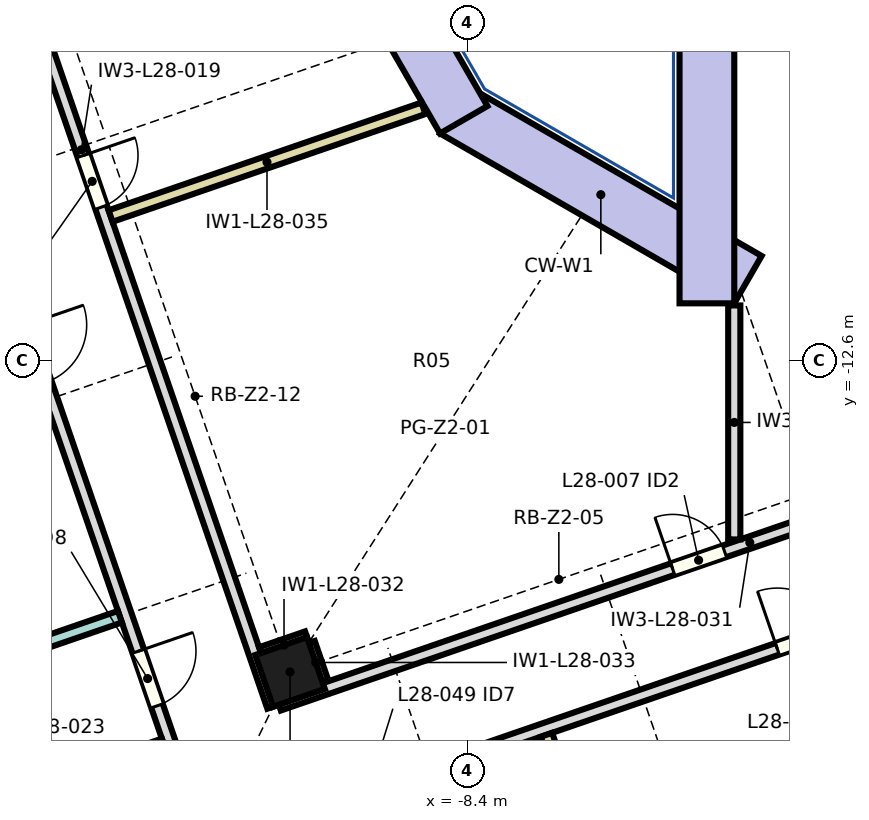
"""IFC4 building model, lengths in metres.
Left out: names, types, materials, properties, quantities, classifications, styles, units other than length and angle.
Written with IfcOpenShell. Run it as: python <this file> out.ifc"""

import sys

from ifc_helpers import new_model, si_unit, direction, frame, frame_2d, origin, origin_2d, place, context, subcontext, project, spatial, rectangle, extrude, element, fill, save


model = new_model("IFC4")
c1 = context("Model", 3, precision=1e-05, world=origin(), true_north=direction((0.0, 1.0)))
c2 = subcontext(c1, "Body", "Model", "MODEL_VIEW")
j1 = project(units=[si_unit("LENGTHUNIT", "METRE"), si_unit("PLANEANGLEUNIT", "RADIAN")], contexts=[c1])
p1 = place(None, origin())
s1 = spatial("IfcSite", under=j1, at=p1, CompositionType="ELEMENT")
p2 = place(p1, origin())
s2 = spatial("IfcBuilding", under=s1, at=p2, CompositionType="ELEMENT")
p3 = place(p2, frame((0.0, 0.0, 134.5)))
s3 = spatial("IfcBuildingStorey", under=s2, at=p3, CompositionType="ELEMENT", Elevation=134.5)
p4 = place(p3, frame((-11.305, -17.695, 0.0), z_axis=(0.0, 0.0, 1.0), x_axis=(0.945518575599, 0.325568154457, 0.0)))
e1 = element("IfcColumn", 1, at=p4, inside=s3, PredefinedType="COLUMN", context=c2, shape_type="SweptSolid", body=[
    extrude(rectangle(XDim=0.9, YDim=0.9, at=origin_2d()), origin(), (0.0, 0.0, 1.0), 3.55),
])
p5 = place(p3, frame((-3.775, -11.243, 0.0), z_axis=(0.0, 0.0, 1.0), x_axis=(-0.866026961591, 0.49999730179, 0.0)))
e2 = element("IfcWall", 2, at=p5, inside=s3, PredefinedType="SHEAR", context=c2, shape_type="SweptSolid", body=[
    extrude(rectangle(XDim=5.587, YDim=0.9, at=frame_2d((2.794, 0.0))), origin(), (0.0, 0.0, 1.0), 3.8),
])
p6 = place(p3, frame((-8.449, -8.614, 0.0), z_axis=(0.0, 0.0, 1.0), x_axis=(-0.499990282633, 0.866031014036, 0.0)))
e3 = element("IfcWall", 3, at=p6, inside=s3, PredefinedType="SHEAR", context=c2, shape_type="SweptSolid", body=[
    extrude(rectangle(XDim=6.47, YDim=0.9, at=frame_2d((3.235, 0.0))), origin(), (0.0, 0.0, 1.0), 3.8),
])
p7 = place(p3, frame((-4.45, 11.633, 0.0), z_axis=(0.0, 0.0, 1.0), x_axis=(0.0, -1.0, 0.0)))
e4 = element("IfcWall", 4, at=p7, inside=s3, PredefinedType="SHEAR", context=c2, shape_type="SweptSolid", body=[
    extrude(rectangle(XDim=23.265, YDim=0.9, at=frame_2d((11.633, 0.0))), origin(), (0.0, 0.0, 1.0), 3.8),
])
p8 = place(p7, frame((14.607, 0.0, 0.0)))
e5 = element("IfcOpeningElement", 5, at=p8, cuts=e4, PredefinedType="OPENING", context=c2, shape_type="SweptSolid", body=[
    extrude(rectangle(XDim=1.1, YDim=2.1, at=frame_2d((0.55, 1.05))), frame((0.0, 0.46, 0.0), z_axis=(0.0, -1.0, 0.0), x_axis=(1.0, 0.0, 0.0)), (0.0, 0.0, 1.0), 0.92),
])
p9 = place(p7, frame((16.958, 0.0, 0.0)))
e6 = element("IfcOpeningElement", 6, at=p9, cuts=e4, PredefinedType="OPENING", context=c2, shape_type="SweptSolid", body=[
    extrude(rectangle(XDim=1.1, YDim=2.1, at=frame_2d((0.55, 1.05))), frame((0.0, 0.46, 0.0), z_axis=(0.0, -1.0, 0.0), x_axis=(1.0, 0.0, 0.0)), (0.0, 0.0, 1.0), 0.92),
])
p10 = place(p7, frame((5.208, 0.0, 0.0)))
e7 = element("IfcOpeningElement", 7, at=p10, cuts=e4, PredefinedType="OPENING", context=c2, shape_type="SweptSolid", body=[
    extrude(rectangle(XDim=1.1, YDim=2.1, at=frame_2d((0.55, 1.05))), frame((0.0, 0.46, 0.0), z_axis=(0.0, -1.0, 0.0), x_axis=(1.0, 0.0, 0.0)), (0.0, 0.0, 1.0), 0.92),
])
p11 = place(p3, frame((-22.623, 8.265, 0.0), z_axis=(0.0, 0.0, 1.0), x_axis=(0.325567058058, -0.945518953119, 0.0)))
e8 = element("IfcWall", 8, at=p11, inside=s3, PredefinedType="PARTITIONING", context=c2, shape_type="SweptSolid", body=[
    extrude(rectangle(XDim=30.48, YDim=0.2, at=frame_2d((15.24, 0.0))), origin(), (0.0, 0.0, 1.0), 3.55),
])
p12 = place(p11, frame((4.195, 0.0, 0.0)))
e9 = element("IfcOpeningElement", 9, at=p12, cuts=e8, PredefinedType="OPENING", context=c2, shape_type="SweptSolid", body=[
    extrude(rectangle(XDim=0.95, YDim=2.1, at=frame_2d((0.475, 1.05))), frame((0.0, 0.11, 0.0), z_axis=(0.0, -1.0, 0.0), x_axis=(1.0, 0.0, 0.0)), (0.0, 0.0, 1.0), 0.22),
])
p13 = place(p11, frame((10.045, 0.0, 0.0)))
e10 = element("IfcOpeningElement", 10, at=p13, cuts=e8, PredefinedType="OPENING", context=c2, shape_type="SweptSolid", body=[
    extrude(rectangle(XDim=0.95, YDim=2.1, at=frame_2d((0.475, 1.05))), frame((0.0, 0.11, 0.0), z_axis=(0.0, -1.0, 0.0), x_axis=(1.0, 0.0, 0.0)), (0.0, 0.0, 1.0), 0.22),
])
p14 = place(p11, frame((21.42, 0.0, 0.0)))
e11 = element("IfcOpeningElement", 11, at=p14, cuts=e8, PredefinedType="OPENING", context=c2, shape_type="SweptSolid", body=[
    extrude(rectangle(XDim=1.0, YDim=2.1, at=frame_2d((0.5, 1.05))), frame((0.0, 0.11, 0.0), z_axis=(0.0, -1.0, 0.0), x_axis=(1.0, 0.0, 0.0)), (0.0, 0.0, 1.0), 0.22),
])
p15 = place(p11, frame((27.095, 0.0, 0.0)))
e12 = element("IfcOpeningElement", 12, at=p15, cuts=e8, PredefinedType="OPENING", context=c2, shape_type="SweptSolid", body=[
    extrude(rectangle(XDim=0.95, YDim=2.1, at=frame_2d((0.475, 1.05))), frame((0.0, 0.11, 0.0), z_axis=(0.0, -1.0, 0.0), x_axis=(1.0, 0.0, 0.0)), (0.0, 0.0, 1.0), 0.22),
])
p16 = place(p3, frame((-17.892, 0.051, 0.0), z_axis=(0.0, 0.0, 1.0), x_axis=(0.325580537834, -0.94551431157, 0.0)))
e13 = element("IfcWall", 13, at=p16, inside=s3, PredefinedType="PARTITIONING", context=c2, shape_type="SweptSolid", body=[
    extrude(rectangle(XDim=19.374, YDim=0.2, at=frame_2d((9.687, 0.0))), origin(), (0.0, 0.0, 1.0), 3.55),
])
p17 = place(p16, frame((9.786, 0.0, 0.0)))
e14 = element("IfcOpeningElement", 14, at=p17, cuts=e13, PredefinedType="OPENING", context=c2, shape_type="SweptSolid", body=[
    extrude(rectangle(XDim=0.9, YDim=2.1, at=frame_2d((0.45, 1.05))), frame((0.0, 0.11, 0.0), z_axis=(0.0, -1.0, 0.0), x_axis=(1.0, 0.0, 0.0)), (0.0, 0.0, 1.0), 0.22),
])
p18 = place(p3, frame((-15.934, -19.764, 0.0), z_axis=(0.0, 0.0, 1.0), x_axis=(0.945536217154, 0.325516915153, 0.0)))
e15 = element("IfcWall", 15, at=p18, inside=s3, PredefinedType="PARTITIONING", context=c2, shape_type="SweptSolid", body=[
    extrude(rectangle(XDim=2.7, YDim=0.2, at=frame_2d((1.35, 0.0))), origin(), (0.0, 0.0, 1.0), 3.55),
])
p19 = place(p18, frame((0.664, 0.0, 0.0)))
e16 = element("IfcOpeningElement", 16, at=p19, cuts=e15, PredefinedType="OPENING", context=c2, shape_type="SweptSolid", body=[
    extrude(rectangle(XDim=0.8, YDim=2.1, at=frame_2d((0.4, 1.05))), frame((0.0, 0.11, 0.0), z_axis=(0.0, -1.0, 0.0), x_axis=(1.0, 0.0, 0.0)), (0.0, 0.0, 1.0), 0.22),
])
p20 = place(p3, frame((-14.103, -16.786, 0.0), z_axis=(0.0, 0.0, 1.0), x_axis=(-0.945520034471, -0.325563917555, 0.0)))
e17 = element("IfcWall", 17, at=p20, inside=s3, PredefinedType="PARTITIONING", context=c2, shape_type="SweptSolid", body=[
    extrude(rectangle(XDim=7.37, YDim=0.2, at=frame_2d((3.685, 0.0))), origin(), (0.0, 0.0, 1.0), 2.65),
])
p21 = place(p3, frame((-12.586, -20.515, 0.0), z_axis=(0.0, 0.0, 1.0), x_axis=(0.945519939336, 0.325564193852, 0.0)))
e18 = element("IfcWall", 18, at=p21, inside=s3, PredefinedType="PARTITIONING", context=c2, shape_type="SweptSolid", body=[
    extrude(rectangle(XDim=37.28, YDim=0.2, at=frame_2d((18.64, 0.0))), origin(), (0.0, 0.0, 1.0), 3.55),
])
p22 = place(p21, frame((9.83, 0.0, 0.0)))
e19 = element("IfcOpeningElement", 19, at=p22, cuts=e18, PredefinedType="OPENING", context=c2, shape_type="SweptSolid", body=[
    extrude(rectangle(XDim=1.0, YDim=2.1, at=frame_2d((0.5, 1.05))), frame((0.0, 0.11, 0.0), z_axis=(0.0, -1.0, 0.0), x_axis=(1.0, 0.0, 0.0)), (0.0, 0.0, 1.0), 0.22),
])
p23 = place(p21, frame((18.93, 0.0, 0.0)))
e20 = element("IfcOpeningElement", 20, at=p23, cuts=e18, PredefinedType="OPENING", context=c2, shape_type="SweptSolid", body=[
    extrude(rectangle(XDim=1.0, YDim=2.1, at=frame_2d((0.5, 1.05))), frame((0.0, 0.11, 0.0), z_axis=(0.0, -1.0, 0.0), x_axis=(1.0, 0.0, 0.0)), (0.0, 0.0, 1.0), 0.22),
])
p24 = place(p21, frame((30.28, 0.0, 0.0)))
e21 = element("IfcOpeningElement", 21, at=p24, cuts=e18, PredefinedType="OPENING", context=c2, shape_type="SweptSolid", body=[
    extrude(rectangle(XDim=1.0, YDim=2.1, at=frame_2d((0.5, 1.05))), frame((0.0, 0.11, 0.0), z_axis=(0.0, -1.0, 0.0), x_axis=(1.0, 0.0, 0.0)), (0.0, 0.0, 1.0), 0.22),
])
p25 = place(p21, frame((0.13, 0.0, 0.0)))
e22 = element("IfcOpeningElement", 22, at=p25, cuts=e18, PredefinedType="OPENING", context=c2, shape_type="SweptSolid", body=[
    extrude(rectangle(XDim=1.0, YDim=2.1, at=frame_2d((0.5, 1.05))), frame((0.0, 0.11, 0.0), z_axis=(0.0, -1.0, 0.0), x_axis=(1.0, 0.0, 0.0)), (0.0, 0.0, 1.0), 0.22),
])
p26 = place(p21, frame((34.23, 0.0, 0.0)))
e23 = element("IfcOpeningElement", 23, at=p26, cuts=e18, PredefinedType="OPENING", context=c2, shape_type="SweptSolid", body=[
    extrude(rectangle(XDim=1.1, YDim=2.1, at=frame_2d((0.55, 1.05))), frame((0.0, 0.11, 0.0), z_axis=(0.0, -1.0, 0.0), x_axis=(1.0, 0.0, 0.0)), (0.0, 0.0, 1.0), 0.22),
])
p27 = place(p3, frame((-11.49, -18.234, 0.0), z_axis=(0.0, 0.0, 1.0), x_axis=(0.945522545762, 0.325556624039, 0.0)))
e24 = element("IfcWall", 24, at=p27, inside=s3, PredefinedType="PARTITIONING", context=c2, shape_type="SweptSolid", body=[
    extrude(rectangle(XDim=16.382, YDim=0.2, at=frame_2d((8.191, 0.0))), origin(), (0.0, 0.0, 1.0), 3.55),
])
p28 = place(p27, frame((6.851, 0.0, 0.0)))
e25 = element("IfcOpeningElement", 25, at=p28, cuts=e24, PredefinedType="OPENING", context=c2, shape_type="SweptSolid", body=[
    extrude(rectangle(XDim=0.9, YDim=2.1, at=frame_2d((0.45, 1.05))), frame((0.0, 0.11, 0.0), z_axis=(0.0, -1.0, 0.0), x_axis=(1.0, 0.0, 0.0)), (0.0, 0.0, 1.0), 0.22),
])
p29 = place(p27, frame((11.152, 0.0, 0.0)))
e26 = element("IfcOpeningElement", 26, at=p29, cuts=e24, PredefinedType="OPENING", context=c2, shape_type="SweptSolid", body=[
    extrude(rectangle(XDim=2.0, YDim=2.1, at=frame_2d((1.0, 1.05))), frame((0.0, 0.11, 0.0), z_axis=(0.0, -1.0, 0.0), x_axis=(1.0, 0.0, 0.0)), (0.0, 0.0, 1.0), 0.22),
])
p30 = place(p3, frame((-11.026, -17.123, 0.0), z_axis=(0.0, 0.0, 1.0), x_axis=(-0.945525269499, -0.325548713312, 0.0)))
e27 = element("IfcWall", 27, at=p30, inside=s3, PredefinedType="PARTITIONING", context=c2, shape_type="SweptSolid", body=[
    extrude(rectangle(XDim=0.8, YDim=0.2, at=frame_2d((0.4, 0.0))), origin(), (0.0, 0.0, 1.0), 3.55),
])
p31 = place(p3, frame((-10.772, -17.86, 0.0), z_axis=(0.0, 0.0, 1.0), x_axis=(-0.325691873105, 0.945475966798, 0.0)))
e28 = element("IfcWall", 28, at=p31, inside=s3, PredefinedType="PARTITIONING", context=c2, shape_type="SweptSolid", body=[
    extrude(rectangle(XDim=0.68, YDim=0.2, at=frame_2d((0.34, 0.0))), origin(), (0.0, 0.0, 1.0), 3.55),
])
p32 = place(p3, frame((-9.112, -8.426, 0.0), z_axis=(0.0, 0.0, 1.0), x_axis=(-0.945518793757, -0.32556752088, 0.0)))
e29 = element("IfcWall", 29, at=p32, inside=s3, PredefinedType="PARTITIONING", context=c2, shape_type="SweptSolid", body=[
    extrude(rectangle(XDim=5.441, YDim=0.2, at=frame_2d((2.721, 0.0))), origin(), (0.0, 0.0, 1.0), 3.55),
])
p33 = place(p3, frame((-7.089, -18.728, 0.0), z_axis=(0.0, 0.0, 1.0), x_axis=(0.325565238158, -0.945519579757, 0.0)))
e30 = element("IfcWall", 30, at=p33, inside=s3, PredefinedType="PARTITIONING", context=c2, shape_type="SweptSolid", body=[
    extrude(rectangle(XDim=2.6, YDim=0.2, at=frame_2d((1.3, 0.0))), origin(), (0.0, 0.0, 1.0), 3.55),
])
p34 = place(p33, frame((0.9, 0.0, 0.0)))
e31 = element("IfcOpeningElement", 31, at=p34, cuts=e30, PredefinedType="OPENING", context=c2, shape_type="SweptSolid", body=[
    extrude(rectangle(XDim=0.8, YDim=2.1, at=frame_2d((0.4, 1.05))), frame((0.0, 0.11, 0.0), z_axis=(0.0, -1.0, 0.0), x_axis=(1.0, 0.0, 0.0)), (0.0, 0.0, 1.0), 0.22),
])
p35 = place(p3, frame((-4.0, -11.667, 0.0), z_axis=(0.0, 0.0, 1.0), x_axis=(0.0, -1.0, 0.0)))
e32 = element("IfcWall", 32, at=p35, inside=s3, PredefinedType="PARTITIONING", context=c2, shape_type="SweptSolid", body=[
    extrude(rectangle(XDim=3.848, YDim=0.2, at=frame_2d((1.924, 0.0))), origin(), (0.0, 0.0, 1.0), 3.55),
])
p36 = place(p17, origin())
e33 = element("IfcDoor", 33, at=p36, inside=s3, OperationType="NOTDEFINED", PredefinedType="DOOR", context=c2, shape_type="SweptSolid", body=[
    extrude(rectangle(XDim=0.9, YDim=2.1, at=frame_2d((0.45, 1.05))), frame((0.0, 0.025, 0.0), z_axis=(0.0, -1.0, 0.0), x_axis=(1.0, 0.0, 0.0)), (0.0, 0.0, 1.0), 0.05),
])
fill(e14, e33)
p37 = place(p28, origin())
e34 = element("IfcDoor", 34, at=p37, inside=s3, OperationType="NOTDEFINED", PredefinedType="DOOR", context=c2, shape_type="SweptSolid", body=[
    extrude(rectangle(XDim=0.9, YDim=2.1, at=frame_2d((0.45, 1.05))), frame((0.0, 0.025, 0.0), z_axis=(0.0, -1.0, 0.0), x_axis=(1.0, 0.0, 0.0)), (0.0, 0.0, 1.0), 0.05),
])
fill(e25, e34)
p38 = place(p15, origin())
e35 = element("IfcDoor", 35, at=p38, inside=s3, OperationType="NOTDEFINED", PredefinedType="DOOR", context=c2, shape_type="SweptSolid", body=[
    extrude(rectangle(XDim=0.95, YDim=2.1, at=frame_2d((0.475, 1.05))), frame((0.0, 0.025, 0.0), z_axis=(0.0, -1.0, 0.0), x_axis=(1.0, 0.0, 0.0)), (0.0, 0.0, 1.0), 0.05),
])
fill(e12, e35)
p39 = place(p22, origin())
e36 = element("IfcDoor", 36, at=p39, inside=s3, OperationType="NOTDEFINED", PredefinedType="DOOR", context=c2, shape_type="SweptSolid", body=[
    extrude(rectangle(XDim=1.0, YDim=2.1, at=frame_2d((0.5, 1.05))), frame((0.0, 0.025, 0.0), z_axis=(0.0, -1.0, 0.0), x_axis=(1.0, 0.0, 0.0)), (0.0, 0.0, 1.0), 0.05),
])
fill(e19, e36)
save(model, sys.argv[1])
